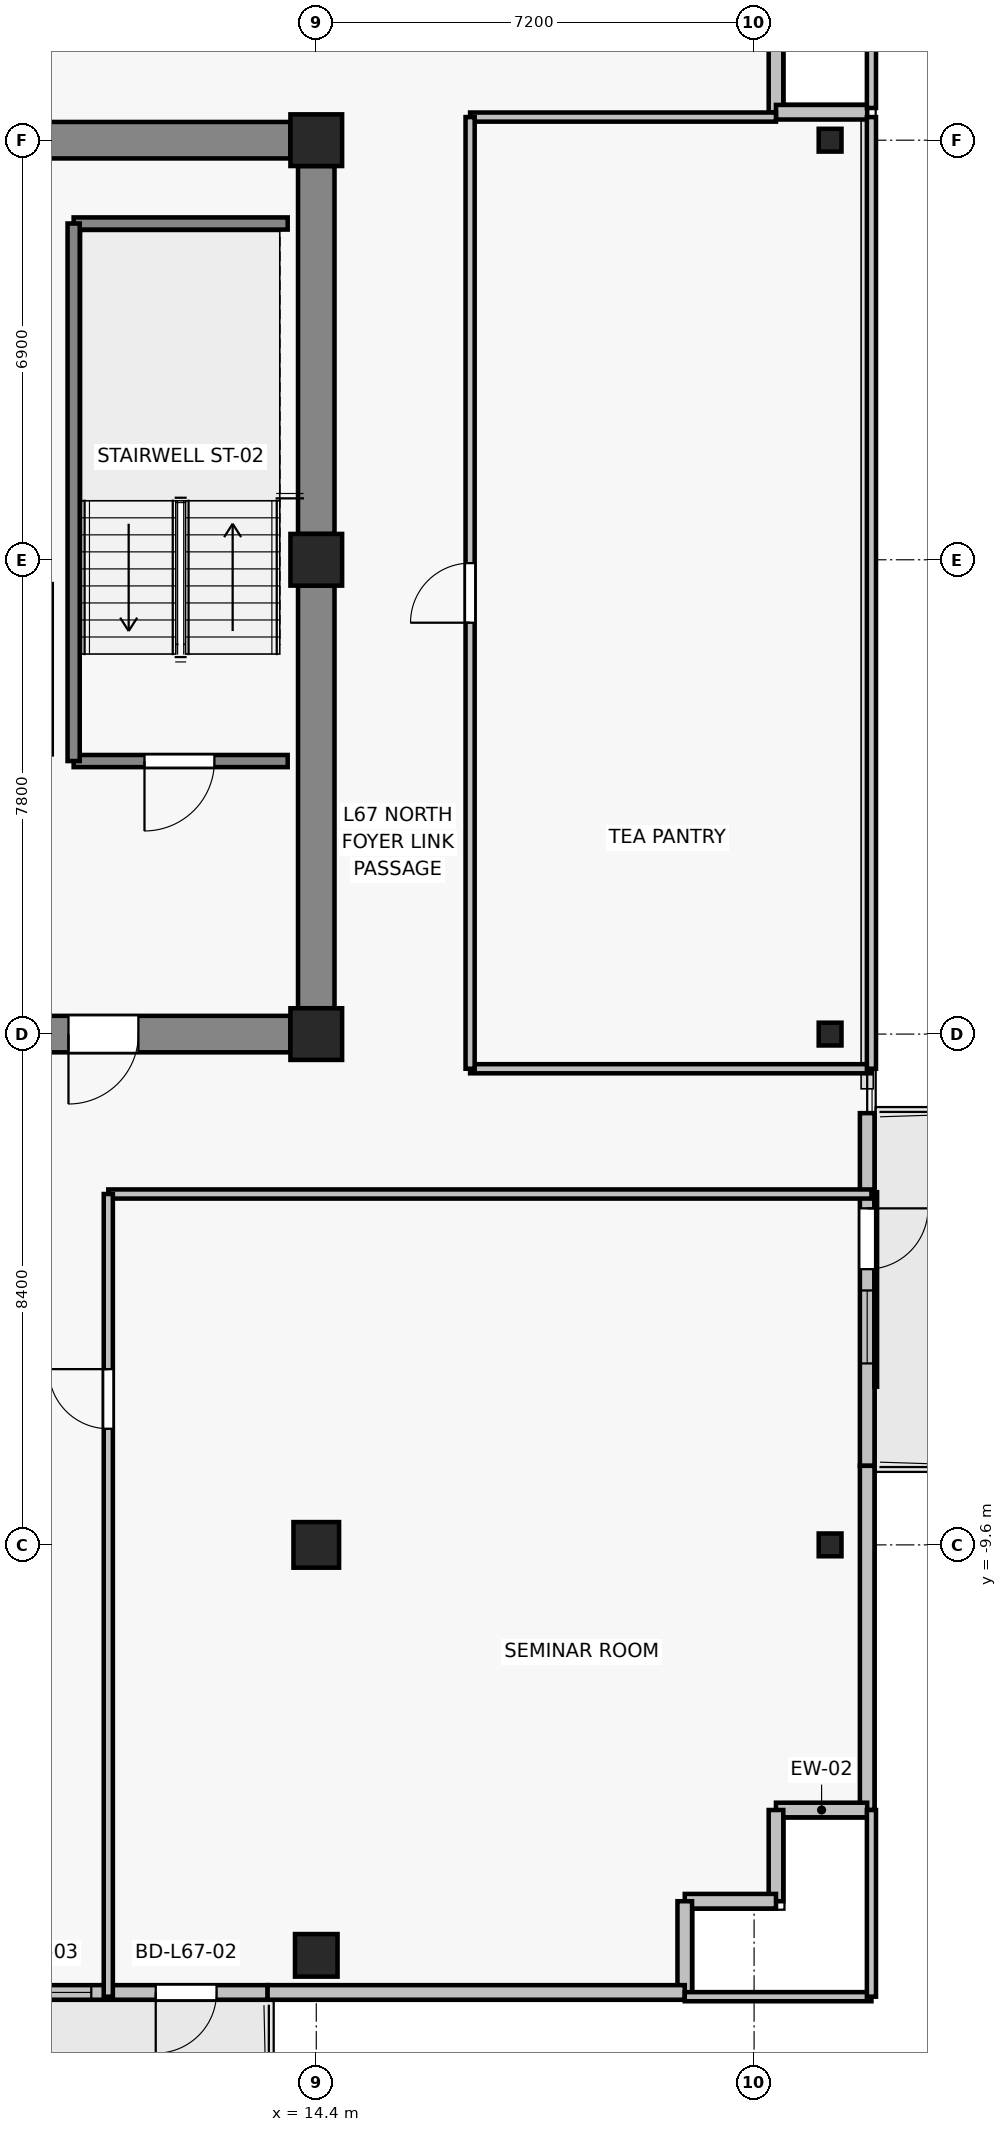
"""IFC4 building model, lengths in metres.
Left out: names, types, materials, properties, quantities, classifications, styles, units other than length and angle.
Written with IfcOpenShell. Run it as: python <this file> out.ifc"""

import sys

from ifc_helpers import new_model, si_unit, direction, frame, frame_2d, origin, origin_2d, place, context, subcontext, project, spatial, rectangle, i_section, extrude, source, transform, mapped, element, fill, save


model = new_model("IFC4")
c1 = context("Model", 3, precision=1e-05, world=origin(), true_north=direction((0.0, 1.0)))
c2 = subcontext(c1, "Body", "Model", "MODEL_VIEW")
j1 = project(units=[si_unit("LENGTHUNIT", "METRE"), si_unit("PLANEANGLEUNIT", "RADIAN")], contexts=[c1])
p1 = place(None, origin())
s1 = spatial("IfcSite", under=j1, at=p1, CompositionType="ELEMENT")
p2 = place(p1, origin())
s2 = spatial("IfcBuilding", under=s1, at=p2, CompositionType="ELEMENT")
p3 = place(p2, frame((0.0, 0.0, 238.6)))
s3 = spatial("IfcBuildingStorey", under=s2, at=p3, CompositionType="ELEMENT", Elevation=238.6)
for number, where, z_axis, x_axis in (
    (1, (14.4, -1.2, 0.0), (0.0, 0.0, 1.0), (1.0, 0.0, 0.0)),
    (2, (14.4, 6.6, 0.0), (0.0, 0.0, 1.0), (1.0, 0.0, 0.0)),
    (3, (14.4, 13.5, 0.0), (0.0, 0.0, 1.0), (1.0, 0.0, 0.0)),
):
    element("IfcColumn", number, at=place(p3, frame(where, z_axis=z_axis, x_axis=x_axis)), inside=s3, PredefinedType="COLUMN", context=c2, shape_type="SweptSolid", body=[
        extrude(rectangle(XDim=0.85, YDim=0.85, at=origin_2d()), origin(), (0.0, 0.0, 1.0), 3.3),
    ])
p4 = place(p3, frame((14.4, -9.6, 0.0), z_axis=(0.0, 0.0, 1.0), x_axis=(1.0, 0.0, 0.0)))
e4 = element("IfcColumn", 4, at=p4, inside=s3, PredefinedType="COLUMN", context=c2, shape_type="SweptSolid", body=[
    extrude(rectangle(XDim=0.75, YDim=0.75, at=origin_2d()), origin(), (0.0, 0.0, 1.0), 3.3),
])
p5 = place(p3, frame((14.4, -16.35, 0.0), z_axis=(0.0, 0.0, 1.0), x_axis=(1.0, 0.0, 0.0)))
e5 = element("IfcColumn", 5, at=p5, inside=s3, PredefinedType="COLUMN", context=c2, shape_type="SweptSolid", body=[
    extrude(rectangle(XDim=0.7, YDim=0.7, at=origin_2d()), origin(), (0.0, 0.0, 1.0), 3.3),
])
for number, where, z_axis, x_axis in (
    (6, (22.85, -9.6, 0.0), (0.0, 0.0, 1.0), (1.0, 0.0, 0.0)),
    (7, (22.85, -1.2, 0.0), (0.0, 0.0, 1.0), (1.0, 0.0, 0.0)),
    (8, (22.85, 13.5, 0.0), (0.0, 0.0, 1.0), (1.0, 0.0, 0.0)),
):
    element("IfcColumn", number, at=place(p3, frame(where, z_axis=z_axis, x_axis=x_axis)), inside=s3, PredefinedType="COLUMN", context=c2, shape_type="SweptSolid", body=[
        extrude(i_section(OverallWidth=0.375, OverallDepth=0.375, WebThickness=0.017, FlangeThickness=0.027, FilletRadius=0.015, at=origin_2d()), origin(), (0.0, 0.0, 1.0), 3.3),
    ])
p6 = place(p3, frame((7.625, 13.5, 0.0), z_axis=(0.0, 0.0, 1.0), x_axis=(1.0, 0.0, 0.0)))
e9 = element("IfcWall", 9, at=p6, inside=s3, PredefinedType="SHEAR", context=c2, shape_type="SweptSolid", body=[
    extrude(rectangle(XDim=6.35, YDim=0.6, at=frame_2d((3.175, 0.0))), origin(), (0.0, 0.0, 1.0), 3.075),
])
p7 = place(p3, frame((14.4, -0.775, 0.0), z_axis=(0.0, 0.0, 1.0), x_axis=(0.0, 1.0, 0.0)))
e10 = element("IfcWall", 10, at=p7, inside=s3, PredefinedType="SHEAR", context=c2, shape_type="SweptSolid", body=[
    extrude(rectangle(XDim=6.95, YDim=0.6, at=frame_2d((3.475, 0.0))), origin(), (0.0, 0.0, 1.0), 3.075),
])
p8 = place(p3, frame((14.4, 7.025, 0.0), z_axis=(0.0, 0.0, 1.0), x_axis=(0.0, 1.0, 0.0)))
e11 = element("IfcWall", 11, at=p8, inside=s3, PredefinedType="SHEAR", context=c2, shape_type="SweptSolid", body=[
    extrude(rectangle(XDim=6.05, YDim=0.6, at=frame_2d((3.025, 0.0))), origin(), (0.0, 0.0, 1.0), 3.075),
])
p9 = place(p3, frame((13.975, -1.2, 0.0), z_axis=(0.0, 0.0, 1.0), x_axis=(-1.0, 0.0, 0.0)))
e12 = element("IfcWall", 12, at=p9, inside=s3, PredefinedType="SHEAR", context=c2, shape_type="SweptSolid", body=[
    extrude(rectangle(XDim=6.35, YDim=0.6, at=frame_2d((3.175, 0.0))), origin(), (0.0, 0.0, 1.0), 3.075),
])
p10 = place(p9, frame((2.5, 0.0, 0.0)))
e13 = element("IfcOpeningElement", 13, at=p10, cuts=e12, PredefinedType="OPENING", context=c2, shape_type="SweptSolid", body=[
    extrude(rectangle(XDim=1.15, YDim=2.15, at=frame_2d((0.575, 1.075))), frame((0.0, 0.31, 0.0), z_axis=(0.0, -1.0, 0.0), x_axis=(1.0, 0.0, 0.0)), (0.0, 0.0, 1.0), 0.62),
])
p11 = place(p3, frame((13.6, -16.96, 0.0), z_axis=(0.0, 0.0, 1.0), x_axis=(-1.0, 0.0, 0.0)))
e14 = element("IfcWall", 14, at=p11, inside=s3, PredefinedType="SOLIDWALL", context=c2, shape_type="SweptSolid", body=[
    extrude(rectangle(XDim=7.0, YDim=0.24, at=frame_2d((3.5, 0.0))), origin(), (0.0, 0.0, 1.0), 2.665),
])
p12 = place(p11, frame((0.84, 0.0, 0.0)))
e15 = element("IfcOpeningElement", 15, at=p12, cuts=e14, PredefinedType="OPENING", context=c2, shape_type="SweptSolid", body=[
    extrude(rectangle(XDim=1.0, YDim=2.2, at=frame_2d((0.5, 1.1))), frame((0.0, 0.13, 0.0), z_axis=(0.0, -1.0, 0.0), x_axis=(1.0, 0.0, 0.0)), (0.0, 0.0, 1.0), 0.26),
])
p13 = place(p11, frame((2.9, 0.0, 0.85)))
e16 = element("IfcOpeningElement", 16, at=p13, cuts=e14, PredefinedType="OPENING", context=c2, shape_type="SweptSolid", body=[
    extrude(rectangle(XDim=1.5, YDim=1.6, at=frame_2d((0.75, 0.8))), frame((0.0, 0.13, 0.0), z_axis=(0.0, -1.0, 0.0), x_axis=(1.0, 0.0, 0.0)), (0.0, 0.0, 1.0), 0.26),
])
p14 = place(p3, frame((23.46, -2.5, 0.0), z_axis=(0.0, 0.0, 1.0), x_axis=(0.0, -1.0, 0.0)))
e17 = element("IfcWall", 17, at=p14, inside=s3, PredefinedType="SOLIDWALL", context=c2, shape_type="SweptSolid", body=[
    extrude(rectangle(XDim=5.8, YDim=0.24, at=frame_2d((2.9, 0.0))), origin(), (0.0, 0.0, 1.0), 3.075),
])
p15 = place(p14, frame((1.566, 0.0, 0.0)))
e18 = element("IfcOpeningElement", 18, at=p15, cuts=e17, PredefinedType="OPENING", context=c2, shape_type="SweptSolid", body=[
    extrude(rectangle(XDim=1.0, YDim=2.2, at=frame_2d((0.5, 1.1))), frame((0.0, 0.13, 0.0), z_axis=(0.0, -1.0, 0.0), x_axis=(1.0, 0.0, 0.0)), (0.0, 0.0, 1.0), 0.26),
])
p16 = place(p14, frame((2.916, 0.0, 0.85)))
e19 = element("IfcOpeningElement", 19, at=p16, cuts=e17, PredefinedType="OPENING", context=c2, shape_type="SweptSolid", body=[
    extrude(rectangle(XDim=1.2, YDim=1.5, at=frame_2d((0.6, 0.75))), frame((0.0, 0.13, 0.0), z_axis=(0.0, -1.0, 0.0), x_axis=(1.0, 0.0, 0.0)), (0.0, 0.0, 1.0), 0.26),
])
for number, where, z_axis, x_axis in (
    (20, (21.96, 13.96, 0.0), (0.0, 0.0, 1.0), (0.0, 1.0, 0.0)),
    (21, (23.46, 13.96, 0.0), (0.0, 0.0, 1.0), (-1.0, 0.0, 0.0)),
):
    element("IfcWall", number, at=place(p3, frame(where, z_axis=z_axis, x_axis=x_axis)), inside=s3, PredefinedType="SOLIDWALL", context=c2, shape_type="SweptSolid", body=[
        extrude(rectangle(XDim=1.5, YDim=0.24, at=frame_2d((0.75, 0.0))), origin(), (0.0, 0.0, 1.0), 3.075),
    ])
p17 = place(p3, frame((23.46, -13.96, 0.0), z_axis=(0.0, 0.0, 1.0), x_axis=(0.0, 1.0, 0.0)))
e22 = element("IfcWall", 22, at=p17, inside=s3, PredefinedType="SOLIDWALL", context=c2, shape_type="SweptSolid", body=[
    extrude(rectangle(XDim=5.66, YDim=0.24, at=frame_2d((2.83, 0.0))), origin(), (0.0, 0.0, 1.0), 3.075),
])
for number, where, z_axis, x_axis in (
    (23, (21.96, -13.96, 0.0), (0.0, 0.0, 1.0), (1.0, 0.0, 0.0)),
    (24, (21.96, -15.46, 0.0), (0.0, 0.0, 1.0), (0.0, 1.0, 0.0)),
    (25, (20.46, -15.46, 0.0), (0.0, 0.0, 1.0), (1.0, 0.0, 0.0)),
    (26, (20.46, -16.96, 0.0), (0.0, 0.0, 1.0), (0.0, 1.0, 0.0)),
):
    element("IfcWall", number, at=place(p3, frame(where, z_axis=z_axis, x_axis=x_axis)), inside=s3, PredefinedType="SOLIDWALL", context=c2, shape_type="SweptSolid", body=[
        extrude(rectangle(XDim=1.5, YDim=0.24, at=frame_2d((0.75, 0.0))), origin(), (0.0, 0.0, 1.0), 3.075),
    ])
p18 = place(p3, frame((13.6, -16.96, 0.0), z_axis=(0.0, 0.0, 1.0), x_axis=(1.0, 0.0, 0.0)))
e27 = element("IfcWall", 27, at=p18, inside=s3, PredefinedType="SOLIDWALL", context=c2, shape_type="SweptSolid", body=[
    extrude(rectangle(XDim=6.86, YDim=0.24, at=frame_2d((3.43, 0.0))), origin(), (0.0, 0.0, 1.0), 2.665),
])
p19 = place(p3, frame((13.93, 3.29, 0.0), z_axis=(0.0, 0.0, 1.0), x_axis=(-1.0, 0.0, 0.0)))
e28 = element("IfcWall", 28, at=p19, inside=s3, PredefinedType="SOLIDWALL", context=c2, shape_type="SweptSolid", body=[
    extrude(rectangle(XDim=3.52, YDim=0.2, at=frame_2d((1.76, 0.0))), origin(), (0.0, 0.0, 1.0), 3.075),
])
p20 = place(p19, frame((1.205, 0.0, 0.0)))
e29 = element("IfcOpeningElement", 29, at=p20, cuts=e28, PredefinedType="OPENING", context=c2, shape_type="SweptSolid", body=[
    extrude(rectangle(XDim=1.15, YDim=2.15, at=frame_2d((0.575, 1.075))), frame((0.0, 0.11, 0.0), z_axis=(0.0, -1.0, 0.0), x_axis=(1.0, 0.0, 0.0)), (0.0, 0.0, 1.0), 0.22),
])
p21 = place(p3, frame((10.41, 12.13, 0.0), z_axis=(0.0, 0.0, 1.0), x_axis=(1.0, 0.0, 0.0)))
e30 = element("IfcWall", 30, at=p21, inside=s3, PredefinedType="SOLIDWALL", context=c2, shape_type="SweptSolid", body=[
    extrude(rectangle(XDim=3.52, YDim=0.2, at=frame_2d((1.76, 0.0))), origin(), (0.0, 0.0, 1.0), 3.075),
])
p22 = place(p3, frame((10.41, 3.29, 0.0), z_axis=(0.0, 0.0, 1.0), x_axis=(0.0, 1.0, 0.0)))
e31 = element("IfcWall", 31, at=p22, inside=s3, PredefinedType="SOLIDWALL", context=c2, shape_type="SweptSolid", body=[
    extrude(rectangle(XDim=8.84, YDim=0.2, at=frame_2d((4.42, 0.0))), origin(), (0.0, 0.0, 1.0), 3.075),
])
p23 = place(p3, frame((23.53, -17.03, 0.0), z_axis=(0.0, 0.0, 1.0), x_axis=(-1.0, 0.0, 0.0)))
e32 = element("IfcWall", 32, at=p23, inside=s3, PredefinedType="PARTITIONING", context=c2, shape_type="SweptSolid", body=[
    extrude(rectangle(XDim=3.07, YDim=0.15, at=frame_2d((1.535, 0.0))), origin(), (0.0, 0.0, 1.0), 2.665),
])
p24 = place(p3, frame((10.98, -3.83, 0.0), z_axis=(0.0, 0.0, 1.0), x_axis=(1.0, 0.0, 0.0)))
e33 = element("IfcWall", 33, at=p24, inside=s3, PredefinedType="PARTITIONING", context=c2, shape_type="SweptSolid", body=[
    extrude(rectangle(XDim=12.55, YDim=0.15, at=frame_2d((6.275, 0.0))), origin(), (0.0, 0.0, 1.0), 2.615),
])
p25 = place(p3, frame((10.98, -17.03, 0.0), z_axis=(0.0, 0.0, 1.0), x_axis=(0.0, 1.0, 0.0)))
e34 = element("IfcWall", 34, at=p25, inside=s3, PredefinedType="PARTITIONING", context=c2, shape_type="SweptSolid", body=[
    extrude(rectangle(XDim=13.2, YDim=0.15, at=frame_2d((6.6, 0.0))), origin(), (0.0, 0.0, 1.0), 2.615),
])
p26 = place(p25, frame((9.34, 0.0, 0.0)))
e35 = element("IfcOpeningElement", 35, at=p26, cuts=e34, PredefinedType="OPENING", context=c2, shape_type="SweptSolid", body=[
    extrude(rectangle(XDim=0.98, YDim=2.15, at=frame_2d((0.49, 1.075))), frame((0.0, 0.085, 0.0), z_axis=(0.0, -1.0, 0.0), x_axis=(1.0, 0.0, 0.0)), (0.0, 0.0, 1.0), 0.17),
])
p27 = place(p3, frame((23.53, -13.96, 0.0), z_axis=(0.0, 0.0, 1.0), x_axis=(0.0, -1.0, 0.0)))
e36 = element("IfcWall", 36, at=p27, inside=s3, PredefinedType="PARTITIONING", context=c2, shape_type="SweptSolid", body=[
    extrude(rectangle(XDim=3.07, YDim=0.15, at=frame_2d((1.535, 0.0))), origin(), (0.0, 0.0, 1.0), 3.075),
])
p28 = place(p3, frame((23.53, -1.77, 0.0), z_axis=(0.0, 0.0, 1.0), x_axis=(-1.0, 0.0, 0.0)))
e37 = element("IfcWall", 37, at=p28, inside=s3, PredefinedType="PARTITIONING", context=c2, shape_type="SweptSolid", body=[
    extrude(rectangle(XDim=6.6, YDim=0.15, at=frame_2d((3.3, 0.0))), origin(), (0.0, 0.0, 1.0), 2.765),
])
p29 = place(p3, frame((16.93, 13.88, 0.0), z_axis=(0.0, 0.0, 1.0), x_axis=(1.0, 0.0, 0.0)))
e38 = element("IfcWall", 38, at=p29, inside=s3, PredefinedType="PARTITIONING", context=c2, shape_type="SweptSolid", body=[
    extrude(rectangle(XDim=5.03, YDim=0.15, at=frame_2d((2.515, 0.0))), origin(), (0.0, 0.0, 1.0), 3.075),
])
p30 = place(p3, frame((16.93, -1.77, 0.0), z_axis=(0.0, 0.0, 1.0), x_axis=(0.0, 1.0, 0.0)))
e39 = element("IfcWall", 39, at=p30, inside=s3, PredefinedType="PARTITIONING", context=c2, shape_type="SweptSolid", body=[
    extrude(rectangle(XDim=15.65, YDim=0.15, at=frame_2d((7.825, 0.0))), origin(), (0.0, 0.0, 1.0), 2.615),
])
p31 = place(p30, frame((7.335, 0.0, 0.0)))
e40 = element("IfcOpeningElement", 40, at=p31, cuts=e39, PredefinedType="OPENING", context=c2, shape_type="SweptSolid", body=[
    extrude(rectangle(XDim=0.98, YDim=2.15, at=frame_2d((0.49, 1.075))), frame((0.0, 0.085, 0.0), z_axis=(0.0, -1.0, 0.0), x_axis=(1.0, 0.0, 0.0)), (0.0, 0.0, 1.0), 0.17),
])
p32 = place(p3, frame((23.53, 13.88, 0.0), z_axis=(0.0, 0.0, 1.0), x_axis=(0.0, -1.0, 0.0)))
e41 = element("IfcWall", 41, at=p32, inside=s3, PredefinedType="PARTITIONING", context=c2, shape_type="SweptSolid", body=[
    extrude(rectangle(XDim=15.65, YDim=0.15, at=frame_2d((7.825, 0.0))), origin(), (0.0, 0.0, 1.0), 3.075),
])
p33 = place(p3, frame((23.53, 17.03, 0.0), z_axis=(0.0, 0.0, 1.0), x_axis=(0.0, -1.0, 0.0)))
e42 = element("IfcWall", 42, at=p33, inside=s3, PredefinedType="PARTITIONING", context=c2, shape_type="SweptSolid", body=[
    extrude(rectangle(XDim=3.0, YDim=0.15, at=frame_2d((1.5, 0.0))), origin(), (0.0, 0.0, 1.0), 3.075),
])
m1 = source(origin(), c2, "Body", "SweptSolid", [
    extrude(rectangle(XDim=1.0, YDim=2.2, at=frame_2d((0.5, 1.1))), frame((0.0, 0.025, 0.0), z_axis=(0.0, -1.0, 0.0), x_axis=(1.0, 0.0, 0.0)), (0.0, 0.0, 1.0), 0.05),
])
p34 = place(p12, origin())
e43 = element("IfcDoor", 43, at=p34, inside=s3, OperationType="SINGLE_SWING_RIGHT", PredefinedType="DOOR", context=c2, shape_type="MappedRepresentation", body=[
    mapped(m1, transform((0.0, 0.0, 0.0), x_axis=(1.0, 0.0, 0.0), y_axis=(0.0, 1.0, 0.0), z_axis=(0.0, 0.0, 1.0), scale=1.0)),
])
fill(e15, e43)
m2 = source(origin(), c2, "Body", "SweptSolid", [
    extrude(rectangle(XDim=1.5, YDim=1.6, at=frame_2d((0.75, 0.8))), frame((0.0, 0.03, 0.0), z_axis=(0.0, -1.0, 0.0), x_axis=(1.0, 0.0, 0.0)), (0.0, 0.0, 1.0), 0.06),
])
p35 = place(p13, origin())
e44 = element("IfcWindow", 44, at=p35, inside=s3, PartitioningType="SINGLE_PANEL", PredefinedType="WINDOW", context=c2, shape_type="MappedRepresentation", body=[
    mapped(m2, transform((0.0, 0.0, 0.0), x_axis=(1.0, 0.0, 0.0), y_axis=(0.0, 1.0, 0.0), z_axis=(0.0, 0.0, 1.0), scale=1.0)),
])
fill(e16, e44)
p36 = place(p15, origin())
e45 = element("IfcDoor", 45, at=p36, inside=s3, OperationType="SINGLE_SWING_LEFT", PredefinedType="DOOR", context=c2, shape_type="MappedRepresentation", body=[
    mapped(m1, transform((0.0, 0.0, 0.0), x_axis=(1.0, 0.0, 0.0), y_axis=(0.0, 1.0, 0.0), z_axis=(0.0, 0.0, 1.0), scale=1.0)),
])
fill(e18, e45)
m3 = source(origin(), c2, "Body", "SweptSolid", [
    extrude(rectangle(XDim=1.2, YDim=1.5, at=frame_2d((0.6, 0.75))), frame((0.0, 0.03, 0.0), z_axis=(0.0, -1.0, 0.0), x_axis=(1.0, 0.0, 0.0)), (0.0, 0.0, 1.0), 0.06),
])
p37 = place(p16, origin())
e46 = element("IfcWindow", 46, at=p37, inside=s3, PartitioningType="SINGLE_PANEL", PredefinedType="WINDOW", context=c2, shape_type="MappedRepresentation", body=[
    mapped(m3, transform((0.0, 0.0, 0.0), x_axis=(1.0, 0.0, 0.0), y_axis=(0.0, 1.0, 0.0), z_axis=(0.0, 0.0, 1.0), scale=1.0)),
])
fill(e19, e46)
m4 = source(origin(), c2, "Body", "SweptSolid", [
    extrude(rectangle(XDim=1.15, YDim=2.15, at=frame_2d((0.575, 1.075))), frame((0.0, 0.025, 0.0), z_axis=(0.0, -1.0, 0.0), x_axis=(1.0, 0.0, 0.0)), (0.0, 0.0, 1.0), 0.05),
])
p38 = place(p20, origin())
e47 = element("IfcDoor", 47, at=p38, inside=s3, OperationType="SINGLE_SWING_RIGHT", PredefinedType="DOOR", context=c2, shape_type="MappedRepresentation", body=[
    mapped(m4, transform((0.0, 0.0, 0.0), x_axis=(1.0, 0.0, 0.0), y_axis=(0.0, 1.0, 0.0), z_axis=(0.0, 0.0, 1.0), scale=1.0)),
])
fill(e29, e47)
p39 = place(p10, origin())
e48 = element("IfcDoor", 48, at=p39, inside=s3, OperationType="SINGLE_SWING_RIGHT", PredefinedType="DOOR", context=c2, shape_type="MappedRepresentation", body=[
    mapped(m4, transform((0.0, 0.0, 0.0), x_axis=(1.0, 0.0, 0.0), y_axis=(0.0, 1.0, 0.0), z_axis=(0.0, 0.0, 1.0), scale=1.0)),
])
fill(e13, e48)
m5 = source(origin(), c2, "Body", "SweptSolid", [
    extrude(rectangle(XDim=0.98, YDim=2.15, at=frame_2d((0.49, 1.075))), frame((0.0, 0.025, 0.0), z_axis=(0.0, -1.0, 0.0), x_axis=(1.0, 0.0, 0.0)), (0.0, 0.0, 1.0), 0.05),
])
p40 = place(p26, origin())
e49 = element("IfcDoor", 49, at=p40, inside=s3, OperationType="SINGLE_SWING_RIGHT", PredefinedType="DOOR", context=c2, shape_type="MappedRepresentation", body=[
    mapped(m5, transform((0.0, 0.0, 0.0), x_axis=(1.0, 0.0, 0.0), y_axis=(0.0, 1.0, 0.0), z_axis=(0.0, 0.0, 1.0), scale=1.0)),
])
fill(e35, e49)
p41 = place(p31, origin())
e50 = element("IfcDoor", 50, at=p41, inside=s3, OperationType="SINGLE_SWING_LEFT", PredefinedType="DOOR", context=c2, shape_type="MappedRepresentation", body=[
    mapped(m5, transform((0.0, 0.0, 0.0), x_axis=(1.0, 0.0, 0.0), y_axis=(0.0, 1.0, 0.0), z_axis=(0.0, 0.0, 1.0), scale=1.0)),
])
fill(e40, e50)
save(model, sys.argv[1])
